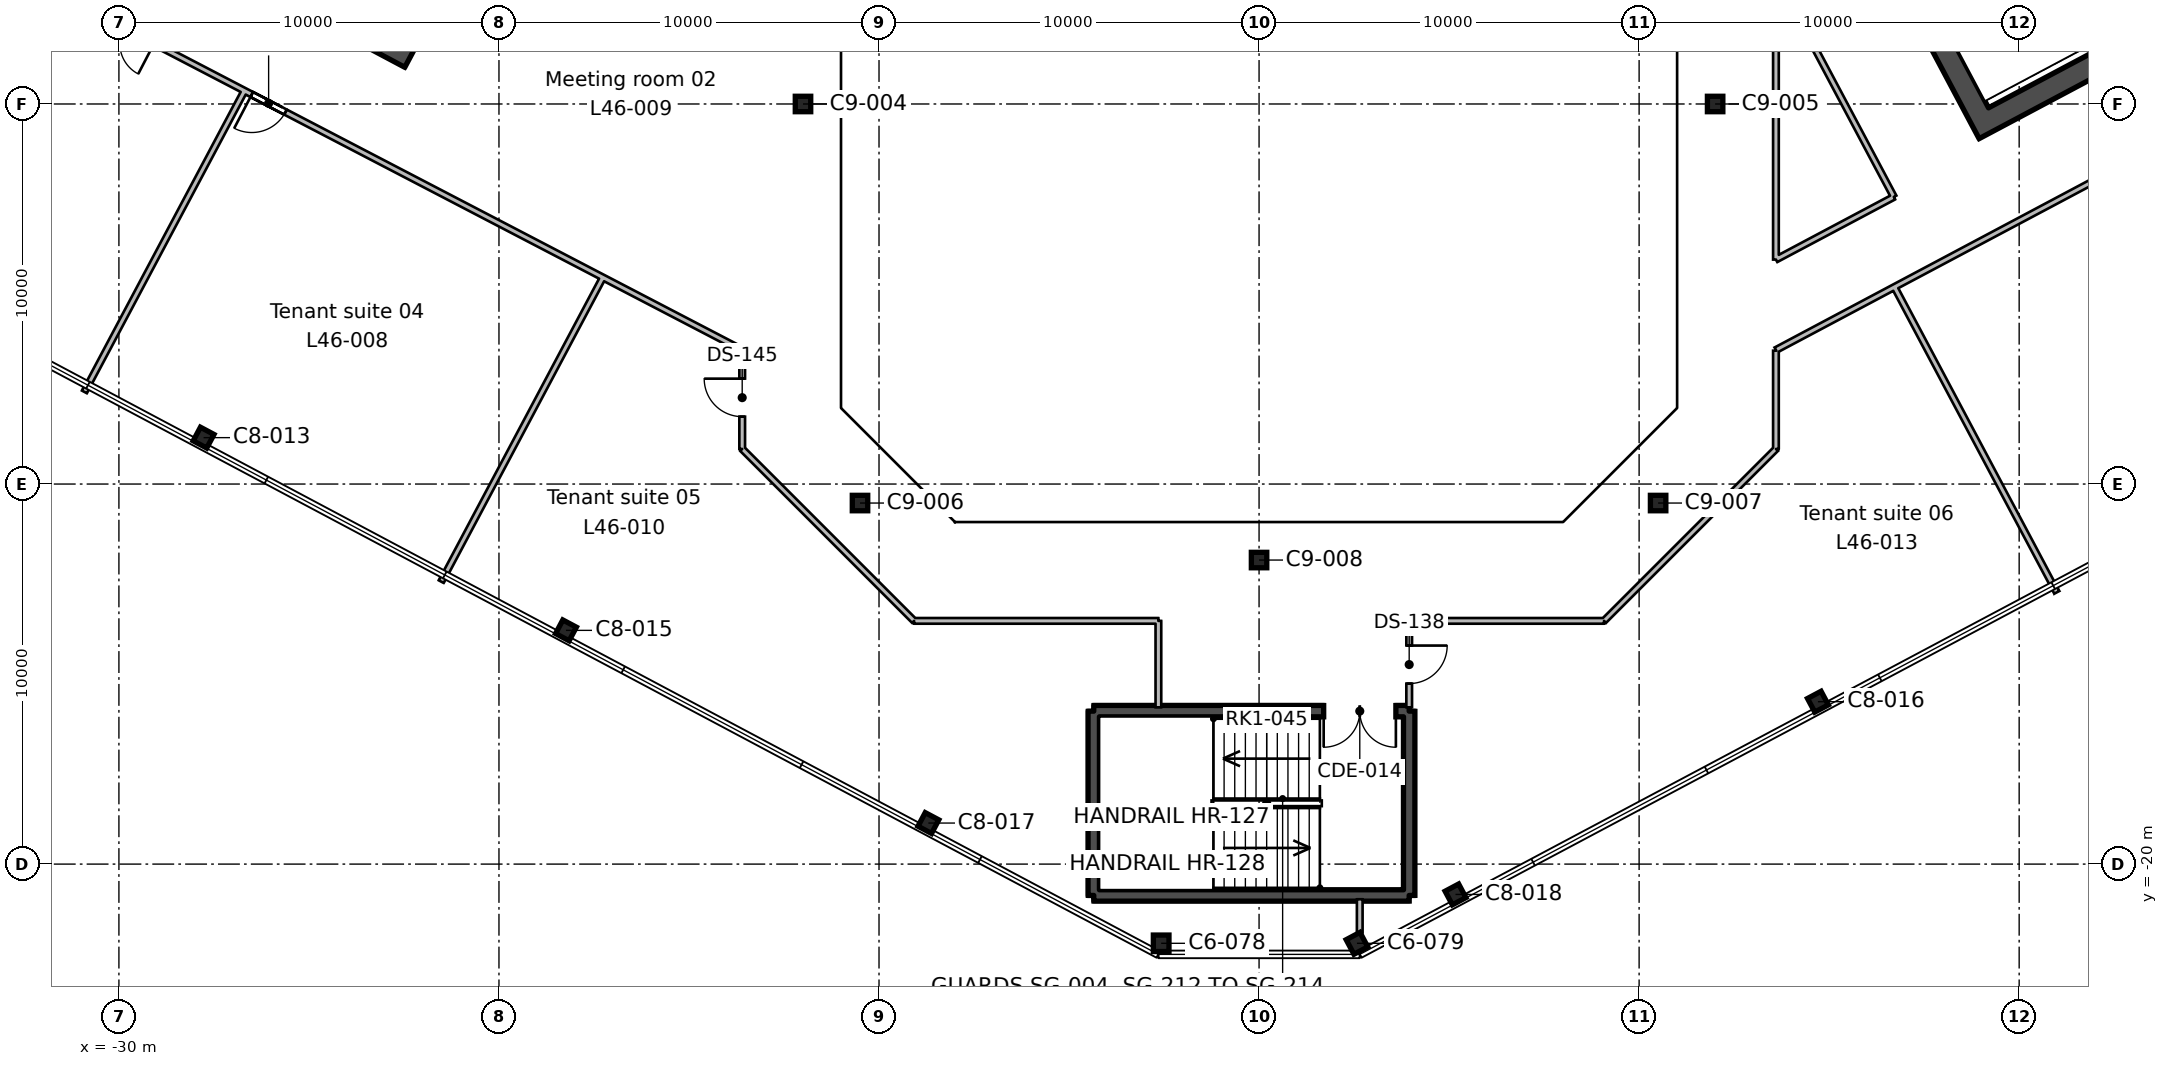
"""IFC4 building model, lengths in metres.
Left out: names, types, materials, properties, quantities, classifications, styles, units other than length and angle.
Written with IfcOpenShell. Run it as: python <this file> out.ifc"""

import sys

from ifc_helpers import new_model, si_unit, direction, frame, frame_2d, origin, origin_2d, place, context, subcontext, project, spatial, rectangle, hollow_rectangle, i_section, extrude, element, fill, save


model = new_model("IFC4")
c1 = context("Model", 3, precision=1e-05, world=origin(), true_north=direction((0.0, 1.0)))
c2 = subcontext(c1, "Body", "Model", "MODEL_VIEW")
j1 = project(units=[si_unit("LENGTHUNIT", "METRE"), si_unit("PLANEANGLEUNIT", "RADIAN")], contexts=[c1])
p1 = place(None, origin())
s1 = spatial("IfcSite", under=j1, at=p1, CompositionType="ELEMENT")
p2 = place(p1, origin())
s2 = spatial("IfcBuilding", under=s1, at=p2, CompositionType="ELEMENT")
p3 = place(p2, frame((0.0, 0.0, 213.0)))
s3 = spatial("IfcBuildingStorey", under=s2, at=p3, CompositionType="ELEMENT", Elevation=213.0)
for number, where, z_axis, x_axis in (
    (1, (-2.576, -22.084, 0.0), (0.0, 0.0, 1.0), (1.0, 0.0, 0.0)),
    (2, (2.576, -22.084, 0.0), (0.0, 0.0, 1.0), (0.883, 0.469, 0.0)),
):
    element("IfcColumn", number, at=place(p3, frame(where, z_axis=z_axis, x_axis=x_axis)), inside=s3, PredefinedType="COLUMN", context=c2, shape_type="SweptSolid", body=[
        extrude(i_section(OverallWidth=0.412, OverallDepth=0.434, WebThickness=0.036, FlangeThickness=0.057, FilletRadius=0.015, at=origin_2d()), origin(), (0.0, 0.0, 1.0), 3.9),
    ])
for number, where, z_axis, x_axis in (
    (3, (5.169, -20.798, 0.0), (0.0, 0.0, 1.0), (0.883, 0.469, 0.0)),
    (4, (-8.701, -18.92, 0.0), (0.0, 0.0, 1.0), (0.883, -0.469, 0.0)),
    (5, (14.705, -15.727, 0.0), (0.0, 0.0, 1.0), (0.883, 0.469, 0.0)),
    (6, (-18.237, -13.85, 0.0), (0.0, 0.0, 1.0), (0.883, -0.469, 0.0)),
):
    element("IfcColumn", number, at=place(p3, frame(where, z_axis=z_axis, x_axis=x_axis)), inside=s3, PredefinedType="COLUMN", context=c2, shape_type="SweptSolid", body=[
        extrude(i_section(OverallWidth=0.404, OverallDepth=0.406, WebThickness=0.027, FlangeThickness=0.044, FilletRadius=0.015, at=origin_2d()), origin(), (0.0, 0.0, 1.0), 3.9),
    ])
for number, where, z_axis, x_axis in (
    (7, (0.0, -12.0, 0.0), (0.0, 0.0, 1.0), (1.0, 0.0, 0.0)),
    (8, (-10.5, -10.5, 0.0), (0.0, 0.0, 1.0), (1.0, 0.0, 0.0)),
    (9, (10.5, -10.5, 0.0), (0.0, 0.0, 1.0), (1.0, 0.0, 0.0)),
):
    element("IfcColumn", number, at=place(p3, frame(where, z_axis=z_axis, x_axis=x_axis)), inside=s3, PredefinedType="COLUMN", context=c2, shape_type="SweptSolid", body=[
        extrude(hollow_rectangle(XDim=0.406, YDim=0.406, WallThickness=0.015, InnerFilletRadius=0.007, OuterFilletRadius=0.022, at=origin_2d()), origin(), (0.0, 0.0, 1.0), 3.9),
    ])
p4 = place(p3, frame((-27.772, -8.779, 0.0), z_axis=(0.0, 0.0, 1.0), x_axis=(0.882947592859, -0.469471562786, 0.0)))
e10 = element("IfcColumn", 10, at=p4, inside=s3, PredefinedType="COLUMN", context=c2, shape_type="SweptSolid", body=[
    extrude(i_section(OverallWidth=0.404, OverallDepth=0.406, WebThickness=0.027, FlangeThickness=0.044, FilletRadius=0.015, at=origin_2d()), origin(), (0.0, 0.0, 1.0), 3.9),
])
for number, where, z_axis, x_axis in (
    (11, (-12.0, 0.0, 0.0), (0.0, 0.0, 1.0), (1.0, 0.0, 0.0)),
    (12, (12.0, 0.0, 0.0), (0.0, 0.0, 1.0), (1.0, 0.0, 0.0)),
):
    element("IfcColumn", number, at=place(p3, frame(where, z_axis=z_axis, x_axis=x_axis)), inside=s3, PredefinedType="COLUMN", context=c2, shape_type="SweptSolid", body=[
        extrude(hollow_rectangle(XDim=0.406, YDim=0.406, WallThickness=0.015, InnerFilletRadius=0.007, OuterFilletRadius=0.022, at=origin_2d()), origin(), (0.0, 0.0, 1.0), 3.9),
    ])
p5 = place(p3, frame((-13.635, 18.236, 0.0), z_axis=(0.0, 0.0, 1.0), x_axis=(-0.469478769487, -0.88294376095, 0.0)))
e13 = element("IfcWall", 13, at=p5, inside=s3, PredefinedType="SHEAR", context=c2, shape_type="SweptSolid", body=[
    extrude(rectangle(XDim=19.4, YDim=0.6, at=frame_2d((9.7, 0.0))), origin(), (0.0, 0.0, 1.0), 3.9),
])
p6 = place(p5, frame((6.7, 0.0, 0.0)))
e14 = element("IfcOpeningElement", 14, at=p6, cuts=e13, PredefinedType="OPENING", context=c2, shape_type="SweptSolid", body=[
    extrude(rectangle(XDim=2.4, YDim=2.4, at=frame_2d((1.2, 1.2))), frame((0.0, 0.31, 0.0), z_axis=(0.0, -1.0, 0.0), x_axis=(1.0, 0.0, 0.0)), (0.0, 0.0, 1.0), 0.62),
])
p7 = place(p3, frame((-22.867, 1.512, 0.0), z_axis=(0.0, 0.0, 1.0), x_axis=(-0.88294509198, 0.469476266226, 0.0)))
e15 = element("IfcWall", 15, at=p7, inside=s3, PredefinedType="SHEAR", context=c2, shape_type="SweptSolid", body=[
    extrude(rectangle(XDim=20.2, YDim=0.6, at=frame_2d((10.1, 0.0))), origin(), (0.0, 0.0, 1.0), 3.9),
])
p8 = place(p3, frame((19.211, -0.771, 0.0), z_axis=(0.0, 0.0, 1.0), x_axis=(-0.469463742137, 0.882951751127, 0.0)))
e16 = element("IfcWall", 16, at=p8, inside=s3, PredefinedType="SHEAR", context=c2, shape_type="SweptSolid", body=[
    extrude(rectangle(XDim=19.4, YDim=0.6, at=frame_2d((9.7, 0.0))), origin(), (0.0, 0.0, 1.0), 3.9),
])
p9 = place(p8, frame((6.7, 0.0, 0.0)))
e17 = element("IfcOpeningElement", 17, at=p9, cuts=e16, PredefinedType="OPENING", context=c2, shape_type="SweptSolid", body=[
    extrude(rectangle(XDim=2.4, YDim=2.4, at=frame_2d((1.2, 1.2))), frame((0.0, 0.31, 0.0), z_axis=(0.0, -1.0, 0.0), x_axis=(1.0, 0.0, 0.0)), (0.0, 0.0, 1.0), 0.62),
])
p10 = place(p3, frame((19.335, -0.366, 0.0), z_axis=(0.0, 0.0, 1.0), x_axis=(0.88294509198, 0.469476266226, 0.0)))
e18 = element("IfcWall", 18, at=p10, inside=s3, PredefinedType="SHEAR", context=c2, shape_type="SweptSolid", body=[
    extrude(rectangle(XDim=20.2, YDim=0.6, at=frame_2d((10.1, 0.0))), origin(), (0.0, 0.0, 1.0), 3.9),
])
p11 = place(p3, frame((3.95, -15.975, 0.0), z_axis=(0.0, 0.0, 1.0), x_axis=(0.0, -1.0, 0.0)))
e19 = element("IfcWall", 19, at=p11, inside=s3, PredefinedType="SHEAR", context=c2, shape_type="SweptSolid", body=[
    extrude(rectangle(XDim=4.85, YDim=0.3, at=frame_2d((2.425, 0.0))), origin(), (0.0, 0.0, 1.0), 3.9),
])
p12 = place(p3, frame((3.95, -20.825, 0.0), z_axis=(0.0, 0.0, 1.0), x_axis=(-1.0, 0.0, 0.0)))
e20 = element("IfcWall", 20, at=p12, inside=s3, PredefinedType="SHEAR", context=c2, shape_type="SweptSolid", body=[
    extrude(rectangle(XDim=8.3, YDim=0.3, at=frame_2d((4.15, 0.0))), origin(), (0.0, 0.0, 1.0), 3.9),
])
p13 = place(p3, frame((-4.35, -20.825, 0.0), z_axis=(0.0, 0.0, 1.0), x_axis=(0.0, 1.0, 0.0)))
e21 = element("IfcWall", 21, at=p13, inside=s3, PredefinedType="SHEAR", context=c2, shape_type="SweptSolid", body=[
    extrude(rectangle(XDim=4.85, YDim=0.3, at=frame_2d((2.425, 0.0))), origin(), (0.0, 0.0, 1.0), 3.9),
])
p14 = place(p3, frame((-4.35, -15.975, 0.0), z_axis=(0.0, 0.0, 1.0), x_axis=(1.0, 0.0, 0.0)))
e22 = element("IfcWall", 22, at=p14, inside=s3, PredefinedType="SHEAR", context=c2, shape_type="SweptSolid", body=[
    extrude(rectangle(XDim=8.3, YDim=0.3, at=frame_2d((4.15, 0.0))), origin(), (0.0, 0.0, 1.0), 3.9),
])
p15 = place(p14, frame((6.05, 0.0, 0.0)))
e23 = element("IfcOpeningElement", 23, at=p15, cuts=e22, PredefinedType="OPENING", context=c2, shape_type="SweptSolid", body=[
    extrude(rectangle(XDim=1.9, YDim=2.1, at=frame_2d((0.95, 1.05))), frame((0.0, 0.16, 0.0), z_axis=(0.0, -1.0, 0.0), x_axis=(1.0, 0.0, 0.0)), (0.0, 0.0, 1.0), 0.32),
])
p16 = place(p3, frame((-26.695, 0.348, 0.0), z_axis=(0.0, 0.0, 1.0), x_axis=(-0.469531763761, -0.8829155808, 0.0)))
e24 = element("IfcWall", 24, at=p16, inside=s3, PredefinedType="PARTITIONING", context=c2, shape_type="SweptSolid", body=[
    extrude(rectangle(XDim=8.975, YDim=0.15, at=frame_2d((4.487, 0.0))), origin(), (0.0, 0.0, 1.0), 3.54),
])
p17 = place(p3, frame((-13.6, -9.077, 0.0), z_axis=(0.0, 0.0, 1.0), x_axis=(0.0, 1.0, 0.0)))
e25 = element("IfcWall", 25, at=p17, inside=s3, PredefinedType="PARTITIONING", context=c2, shape_type="SweptSolid", body=[
    extrude(rectangle(XDim=2.604, YDim=0.15, at=frame_2d((1.302, 0.0))), origin(), (0.0, 0.0, 1.0), 3.54),
])
p18 = place(p17, frame((0.85, 0.0, 0.0)))
e26 = element("IfcOpeningElement", 26, at=p18, cuts=e25, PredefinedType="OPENING", context=c2, shape_type="SweptSolid", body=[
    extrude(rectangle(XDim=1.0, YDim=2.1, at=frame_2d((0.5, 1.05))), frame((0.0, 0.085, 0.0), z_axis=(0.0, -1.0, 0.0), x_axis=(1.0, 0.0, 0.0)), (0.0, 0.0, 1.0), 0.17),
])
p19 = place(p3, frame((-13.6, -6.473, 0.0), z_axis=(0.0, 0.0, 1.0), x_axis=(-0.886887925569, 0.461984639874, 0.0)))
e27 = element("IfcWall", 27, at=p19, inside=s3, PredefinedType="PARTITIONING", context=c2, shape_type="SweptSolid", body=[
    extrude(rectangle(XDim=36.646, YDim=0.15, at=frame_2d((18.323, 0.0))), origin(), (0.0, 0.0, 1.0), 3.54),
])
p20 = place(p19, frame((17.45, 0.0, 0.0)))
e28 = element("IfcOpeningElement", 28, at=p20, cuts=e27, PredefinedType="OPENING", context=c2, shape_type="SweptSolid", body=[
    extrude(rectangle(XDim=1.8, YDim=2.1, at=frame_2d((0.9, 1.05))), frame((0.0, 0.085, 0.0), z_axis=(0.0, -1.0, 0.0), x_axis=(1.0, 0.0, 0.0)), (0.0, 0.0, 1.0), 0.17),
])
p21 = place(p19, frame((13.55, 0.0, 0.0)))
e29 = element("IfcOpeningElement", 29, at=p21, cuts=e27, PredefinedType="OPENING", context=c2, shape_type="SweptSolid", body=[
    extrude(rectangle(XDim=1.0, YDim=2.1, at=frame_2d((0.5, 1.05))), frame((0.0, 0.085, 0.0), z_axis=(0.0, -1.0, 0.0), x_axis=(1.0, 0.0, 0.0)), (0.0, 0.0, 1.0), 0.17),
])
p22 = place(p3, frame((-17.264, -4.564, 0.0), z_axis=(0.0, 0.0, 1.0), x_axis=(-0.469490590471, -0.882937475396, 0.0)))
e30 = element("IfcWall", 30, at=p22, inside=s3, PredefinedType="PARTITIONING", context=c2, shape_type="SweptSolid", body=[
    extrude(rectangle(XDim=9.065, YDim=0.15, at=frame_2d((4.533, 0.0))), origin(), (0.0, 0.0, 1.0), 3.54),
])
p23 = place(p3, frame((-13.6, -9.077, 0.0), z_axis=(0.0, 0.0, 1.0), x_axis=(0.707106781187, -0.707106781187, 0.0)))
e31 = element("IfcWall", 31, at=p23, inside=s3, PredefinedType="PARTITIONING", context=c2, shape_type="SweptSolid", body=[
    extrude(rectangle(XDim=6.397, YDim=0.15, at=frame_2d((3.198, 0.0))), origin(), (0.0, 0.0, 1.0), 3.54),
])
p24 = place(p3, frame((-2.649, -15.875, 0.0), z_axis=(0.0, 0.0, 1.0), x_axis=(0.0, 1.0, 0.0)))
e32 = element("IfcWall", 32, at=p24, inside=s3, PredefinedType="PARTITIONING", context=c2, shape_type="SweptSolid", body=[
    extrude(rectangle(XDim=2.275, YDim=0.15, at=frame_2d((1.137, 0.0))), origin(), (0.0, 0.0, 1.0), 3.54),
])
p25 = place(p3, frame((-2.649, -13.6, 0.0), z_axis=(0.0, 0.0, 1.0), x_axis=(-1.0, 0.0, 0.0)))
e33 = element("IfcWall", 33, at=p25, inside=s3, PredefinedType="PARTITIONING", context=c2, shape_type="SweptSolid", body=[
    extrude(rectangle(XDim=6.428, YDim=0.15, at=frame_2d((3.214, 0.0))), origin(), (0.0, 0.0, 1.0), 3.54),
])
p26 = place(p3, frame((2.649, -21.799, 0.0), z_axis=(0.0, 0.0, 1.0), x_axis=(0.0, 1.0, 0.0)))
e34 = element("IfcWall", 34, at=p26, inside=s3, PredefinedType="PARTITIONING", context=c2, shape_type="SweptSolid", body=[
    extrude(rectangle(XDim=0.874, YDim=0.15, at=frame_2d((0.437, 0.0))), origin(), (0.0, 0.0, 1.0), 3.54),
])
p27 = place(p3, frame((3.95, -13.6, 0.0), z_axis=(0.0, 0.0, 1.0), x_axis=(0.0, -1.0, 0.0)))
e35 = element("IfcWall", 35, at=p27, inside=s3, PredefinedType="PARTITIONING", context=c2, shape_type="SweptSolid", body=[
    extrude(rectangle(XDim=2.275, YDim=0.15, at=frame_2d((1.137, 0.0))), origin(), (0.0, 0.0, 1.0), 3.54),
])
p28 = place(p27, frame((0.65, 0.0, 0.0)))
e36 = element("IfcOpeningElement", 36, at=p28, cuts=e35, PredefinedType="OPENING", context=c2, shape_type="SweptSolid", body=[
    extrude(rectangle(XDim=1.0, YDim=2.1, at=frame_2d((0.5, 1.05))), frame((0.0, 0.085, 0.0), z_axis=(0.0, -1.0, 0.0), x_axis=(1.0, 0.0, 0.0)), (0.0, 0.0, 1.0), 0.17),
])
p29 = place(p3, frame((13.6, -6.491, 0.0), z_axis=(0.0, 0.0, 1.0), x_axis=(0.0, -1.0, 0.0)))
e37 = element("IfcWall", 37, at=p29, inside=s3, PredefinedType="PARTITIONING", context=c2, shape_type="SweptSolid", body=[
    extrude(rectangle(XDim=2.586, YDim=0.15, at=frame_2d((1.293, 0.0))), origin(), (0.0, 0.0, 1.0), 3.54),
])
p30 = place(p3, frame((13.6, -9.077, 0.0), z_axis=(0.0, 0.0, 1.0), x_axis=(-0.707106781187, -0.707106781187, 0.0)))
e38 = element("IfcWall", 38, at=p30, inside=s3, PredefinedType="PARTITIONING", context=c2, shape_type="SweptSolid", body=[
    extrude(rectangle(XDim=6.397, YDim=0.15, at=frame_2d((3.198, 0.0))), origin(), (0.0, 0.0, 1.0), 3.54),
])
p31 = place(p3, frame((9.077, -13.6, 0.0), z_axis=(0.0, 0.0, 1.0), x_axis=(-1.0, 0.0, 0.0)))
e39 = element("IfcWall", 39, at=p31, inside=s3, PredefinedType="PARTITIONING", context=c2, shape_type="SweptSolid", body=[
    extrude(rectangle(XDim=5.092, YDim=0.15, at=frame_2d((2.546, 0.0))), origin(), (0.0, 0.0, 1.0), 3.54),
])
p32 = place(p3, frame((16.718, -4.815, 0.0), z_axis=(0.0, 0.0, 1.0), x_axis=(0.46943766298, -0.882965616871, 0.0)))
e40 = element("IfcWall", 40, at=p32, inside=s3, PredefinedType="PARTITIONING", context=c2, shape_type="SweptSolid", body=[
    extrude(rectangle(XDim=9.1, YDim=0.15, at=frame_2d((4.55, 0.0))), origin(), (0.0, 0.0, 1.0), 3.54),
])
p33 = place(p3, frame((48.239, 11.944, 0.0), z_axis=(0.0, 0.0, 1.0), x_axis=(-0.882956533409, -0.469454747671, 0.0)))
e41 = element("IfcWall", 41, at=p33, inside=s3, PredefinedType="PARTITIONING", context=c2, shape_type="SweptSolid", body=[
    extrude(rectangle(XDim=39.231, YDim=0.15, at=frame_2d((19.615, 0.0))), origin(), (0.0, 0.0, 1.0), 3.54),
])
p34 = place(p33, frame((20.45, 0.0, 0.0)))
e42 = element("IfcOpeningElement", 42, at=p34, cuts=e41, PredefinedType="OPENING", context=c2, shape_type="SweptSolid", body=[
    extrude(rectangle(XDim=1.0, YDim=2.1, at=frame_2d((0.5, 1.05))), frame((0.0, 0.085, 0.0), z_axis=(0.0, -1.0, 0.0), x_axis=(1.0, 0.0, 0.0)), (0.0, 0.0, 1.0), 0.17),
])
p35 = place(p33, frame((18.75, 0.0, 0.0)))
e43 = element("IfcOpeningElement", 43, at=p35, cuts=e41, PredefinedType="OPENING", context=c2, shape_type="SweptSolid", body=[
    extrude(rectangle(XDim=1.0, YDim=2.1, at=frame_2d((0.5, 1.05))), frame((0.0, 0.085, 0.0), z_axis=(0.0, -1.0, 0.0), x_axis=(1.0, 0.0, 0.0)), (0.0, 0.0, 1.0), 0.17),
])
p36 = place(p3, frame((-20.235, -0.567, 0.0), z_axis=(0.0, 0.0, 1.0), x_axis=(0.469499398982, 0.882932791528, 0.0)))
e44 = element("IfcWall", 44, at=p36, inside=s3, PredefinedType="PARTITIONING", context=c2, shape_type="SweptSolid", body=[
    extrude(rectangle(XDim=20.0, YDim=0.15, at=frame_2d((10.0, 0.0))), origin(), (0.0, 0.0, 1.0), 3.54),
])
p37 = place(p36, frame((9.55, 0.0, 0.0)))
e45 = element("IfcOpeningElement", 45, at=p37, cuts=e44, PredefinedType="OPENING", context=c2, shape_type="SweptSolid", body=[
    extrude(rectangle(XDim=1.0, YDim=2.1, at=frame_2d((0.5, 1.05))), frame((0.0, 0.085, 0.0), z_axis=(0.0, -1.0, 0.0), x_axis=(1.0, 0.0, 0.0)), (0.0, 0.0, 1.0), 0.17),
])
p38 = place(p3, frame((-13.6, 9.077, 0.0), z_axis=(0.0, 0.0, 1.0), x_axis=(0.0, -1.0, 0.0)))
e46 = element("IfcWall", 46, at=p38, inside=s3, PredefinedType="PARTITIONING", context=c2, shape_type="SweptSolid", body=[
    extrude(rectangle(XDim=13.171, YDim=0.15, at=frame_2d((6.585, 0.0))), origin(), (0.0, 0.0, 1.0), 3.54),
])
p39 = place(p3, frame((-13.6, -4.094, 0.0), z_axis=(0.0, 0.0, 1.0), x_axis=(-0.882991591568, 0.469388803893, 0.0)))
e47 = element("IfcWall", 47, at=p39, inside=s3, PredefinedType="PARTITIONING", context=c2, shape_type="SweptSolid", body=[
    extrude(rectangle(XDim=7.514, YDim=0.15, at=frame_2d((3.757, 0.0))), origin(), (0.0, 0.0, 1.0), 3.54),
])
p40 = place(p3, frame((13.6, 3.391, 0.0), z_axis=(0.0, 0.0, 1.0), x_axis=(0.0, -1.0, 0.0)))
e48 = element("IfcWall", 48, at=p40, inside=s3, PredefinedType="PARTITIONING", context=c2, shape_type="SweptSolid", body=[
    extrude(rectangle(XDim=7.485, YDim=0.15, at=frame_2d((3.743, 0.0))), origin(), (0.0, 0.0, 1.0), 3.54),
])
p41 = place(p3, frame((13.6, -4.094, 0.0), z_axis=(0.0, 0.0, 1.0), x_axis=(0.883048239113, 0.469282225743, 0.0)))
e49 = element("IfcWall", 49, at=p41, inside=s3, PredefinedType="PARTITIONING", context=c2, shape_type="SweptSolid", body=[
    extrude(rectangle(XDim=3.514, YDim=0.15, at=frame_2d((1.757, 0.0))), origin(), (0.0, 0.0, 1.0), 3.54),
])
p42 = place(p3, frame((16.703, -2.445, 0.0), z_axis=(0.0, 0.0, 1.0), x_axis=(-0.469427966585, 0.88297077199, 0.0)))
e50 = element("IfcWall", 50, at=p42, inside=s3, PredefinedType="PARTITIONING", context=c2, shape_type="SweptSolid", body=[
    extrude(rectangle(XDim=6.61, YDim=0.15, at=frame_2d((3.305, 0.0))), origin(), (0.0, 0.0, 1.0), 3.54),
])
p43 = place(p15, frame((1.9, 0.0, 0.0), z_axis=(0.0, 0.0, 1.0), x_axis=(-1.0, 0.0, 0.0)))
e51 = element("IfcDoor", 51, at=p43, inside=s3, OperationType="DOUBLE_DOOR_SINGLE_SWING", PredefinedType="DOOR", context=c2, shape_type="SweptSolid", body=[
    extrude(rectangle(XDim=1.9, YDim=2.1, at=frame_2d((0.95, 1.05))), frame((0.0, 0.025, 0.0), z_axis=(0.0, -1.0, 0.0), x_axis=(1.0, 0.0, 0.0)), (0.0, 0.0, 1.0), 0.05),
])
fill(e23, e51)
p44 = place(p28, origin())
e52 = element("IfcDoor", 52, at=p44, inside=s3, OperationType="SINGLE_SWING_LEFT", PredefinedType="DOOR", context=c2, shape_type="SweptSolid", body=[
    extrude(rectangle(XDim=1.0, YDim=2.1, at=frame_2d((0.5, 1.05))), frame((0.0, 0.025, 0.0), z_axis=(0.0, -1.0, 0.0), x_axis=(1.0, 0.0, 0.0)), (0.0, 0.0, 1.0), 0.05),
])
fill(e36, e52)
p45 = place(p21, origin())
e53 = element("IfcDoor", 53, at=p45, inside=s3, OperationType="SINGLE_SWING_RIGHT", PredefinedType="DOOR", context=c2, shape_type="SweptSolid", body=[
    extrude(rectangle(XDim=1.0, YDim=2.1, at=frame_2d((0.5, 1.05))), frame((0.0, 0.025, 0.0), z_axis=(0.0, -1.0, 0.0), x_axis=(1.0, 0.0, 0.0)), (0.0, 0.0, 1.0), 0.05),
])
fill(e29, e53)
p46 = place(p18, origin())
e54 = element("IfcDoor", 54, at=p46, inside=s3, OperationType="SINGLE_SWING_RIGHT", PredefinedType="DOOR", context=c2, shape_type="SweptSolid", body=[
    extrude(rectangle(XDim=1.0, YDim=2.1, at=frame_2d((0.5, 1.05))), frame((0.0, 0.025, 0.0), z_axis=(0.0, -1.0, 0.0), x_axis=(1.0, 0.0, 0.0)), (0.0, 0.0, 1.0), 0.05),
])
fill(e26, e54)
save(model, sys.argv[1])
